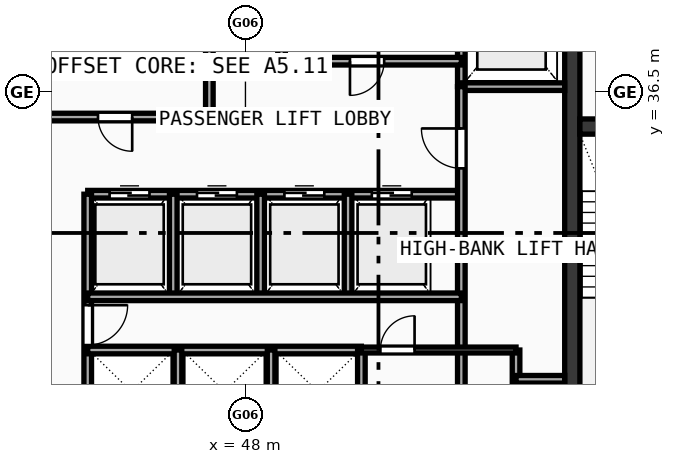
"""IFC4 building model, lengths in metres.
Left out: names, types, materials, properties, quantities, classifications, styles, units other than length and angle.
Written with IfcOpenShell. Run it as: python <this file> out.ifc"""

import sys

from ifc_helpers import new_model, si_unit, direction, frame, frame_2d, origin, origin_with_axes, place, context, subcontext, project, spatial, rectangle, extrude, source, transform, mapped, element, fill, save


model = new_model("IFC4")
c1 = context("Model", 3, precision=1e-05, world=origin(), true_north=direction((0.0, 1.0)))
c2 = subcontext(c1, "Body", "Model", "MODEL_VIEW")
j1 = project(units=[si_unit("LENGTHUNIT", "METRE"), si_unit("PLANEANGLEUNIT", "RADIAN")], contexts=[c1])
p1 = place(None, origin())
s1 = spatial("IfcSite", under=j1, at=p1, CompositionType="ELEMENT")
p2 = place(p1, origin())
s2 = spatial("IfcBuilding", under=s1, at=p2, CompositionType="ELEMENT")
p3 = place(p2, frame((0.0, 0.0, 148.23)))
s3 = spatial("IfcBuildingStorey", under=s2, at=p3, CompositionType="ELEMENT", Elevation=148.23)
p4 = place(p3, frame((56.6, 27.8, 0.0), z_axis=(0.0, 0.0, 1.0), x_axis=(0.0, 1.0, 0.0)))
e1 = element("IfcWall", 1, at=p4, inside=s3, PredefinedType="SHEAR", context=c2, shape_type="SweptSolid", body=[
    extrude(rectangle(XDim=12.1, YDim=0.4, at=frame_2d((6.05, 0.0))), origin(), (0.0, 0.0, 1.0), 3.42),
])
p5 = place(p4, frame((9.95, 0.0, 0.0)))
e2 = element("IfcOpeningElement", 2, at=p5, cuts=e1, PredefinedType="OPENING", context=c2, shape_type="SweptSolid", body=[
    extrude(rectangle(XDim=1.1, YDim=2.1, at=frame_2d((0.55, 1.05))), frame((0.0, 0.21, 0.0), z_axis=(0.0, -1.0, 0.0), x_axis=(1.0, 0.0, 0.0)), (0.0, 0.0, 1.0), 0.42),
])
p6 = place(p3, frame((56.8, 35.6, 0.0), z_axis=(0.0, 0.0, 1.0), x_axis=(1.0, 0.0, 0.0)))
e3 = element("IfcWall", 3, at=p6, inside=s3, PredefinedType="SHEAR", context=c2, shape_type="SweptSolid", body=[
    extrude(rectangle(XDim=3.1, YDim=0.4, at=frame_2d((1.55, 0.0))), origin(), (0.0, 0.0, 1.0), 3.42),
])
p7 = place(p6, frame((1.02, 0.0, 0.0)))
e4 = element("IfcOpeningElement", 4, at=p7, cuts=e3, PredefinedType="OPENING", context=c2, shape_type="SweptSolid", body=[
    extrude(rectangle(XDim=1.05, YDim=2.1, at=frame_2d((0.525, 1.05))), frame((0.0, 0.21, 0.0), z_axis=(0.0, -1.0, 0.0), x_axis=(1.0, 0.0, 0.0)), (0.0, 0.0, 1.0), 0.42),
])
p8 = place(p3, frame((53.68, 36.65, 0.0), z_axis=(0.0, 0.0, 1.0), x_axis=(0.0, 1.0, 0.0)))
e5 = element("IfcWall", 5, at=p8, inside=s3, PredefinedType="SOLIDWALL", context=c2, shape_type="SweptSolid", body=[
    extrude(rectangle(XDim=3.3, YDim=0.2, at=frame_2d((1.65, 0.0))), origin(), (0.0, 0.0, 1.0), 3.42),
])
p9 = place(p3, frame((53.68, 36.65, 0.0), z_axis=(0.0, 0.0, 1.0), x_axis=(1.0, 0.0, 0.0)))
e6 = element("IfcWall", 6, at=p9, inside=s3, PredefinedType="SOLIDWALL", context=c2, shape_type="SweptSolid", body=[
    extrude(rectangle(XDim=2.72, YDim=0.2, at=frame_2d((1.36, 0.0))), origin(), (0.0, 0.0, 1.0), 3.42),
])
p10 = place(p3, frame((42.32, 35.85, 0.0), z_axis=(0.0, 0.0, 1.0), x_axis=(1.0, 0.0, 0.0)))
e7 = element("IfcWall", 7, at=p10, inside=s3, PredefinedType="SOLIDWALL", context=c2, shape_type="SweptSolid", body=[
    extrude(rectangle(XDim=4.73, YDim=0.2, at=frame_2d((2.365, 0.0))), origin(), (0.0, 0.0, 1.0), 3.42),
])
p11 = place(p10, frame((1.8, 0.0, 0.0)))
e8 = element("IfcOpeningElement", 8, at=p11, cuts=e7, PredefinedType="OPENING", context=c2, shape_type="SweptSolid", body=[
    extrude(rectangle(XDim=0.9, YDim=2.1, at=frame_2d((0.45, 1.05))), frame((0.0, 0.11, 0.0), z_axis=(0.0, -1.0, 0.0), x_axis=(1.0, 0.0, 0.0)), (0.0, 0.0, 1.0), 0.22),
])
p12 = place(p3, frame((48.95, 37.32, 0.0), z_axis=(0.0, 0.0, 1.0), x_axis=(1.0, 0.0, 0.0)))
e9 = element("IfcWall", 9, at=p12, inside=s3, PredefinedType="SOLIDWALL", context=c2, shape_type="SweptSolid", body=[
    extrude(rectangle(XDim=4.73, YDim=0.2, at=frame_2d((2.365, 0.0))), origin(), (0.0, 0.0, 1.0), 3.42),
])
p13 = place(p12, frame((1.8, 0.0, 0.0)))
e10 = element("IfcOpeningElement", 10, at=p13, cuts=e9, PredefinedType="OPENING", context=c2, shape_type="SweptSolid", body=[
    extrude(rectangle(XDim=0.9, YDim=2.1, at=frame_2d((0.45, 1.05))), frame((0.0, 0.11, 0.0), z_axis=(0.0, -1.0, 0.0), x_axis=(1.0, 0.0, 0.0)), (0.0, 0.0, 1.0), 0.22),
])
p14 = place(p3, frame((47.05, 35.85, 0.0), z_axis=(0.0, 0.0, 1.0), x_axis=(0.0, 1.0, 0.0)))
e11 = element("IfcWall", 11, at=p14, inside=s3, PredefinedType="SOLIDWALL", context=c2, shape_type="SweptSolid", body=[
    extrude(rectangle(XDim=4.1, YDim=0.2, at=frame_2d((2.05, 0.0))), origin(), (0.0, 0.0, 1.0), 3.42),
])
p15 = place(p3, frame((48.95, 37.32, 0.0), z_axis=(0.0, 0.0, 1.0), x_axis=(0.0, 1.0, 0.0)))
e12 = element("IfcWall", 12, at=p15, inside=s3, PredefinedType="SOLIDWALL", context=c2, shape_type="SweptSolid", body=[
    extrude(rectangle(XDim=2.63, YDim=0.2, at=frame_2d((1.315, 0.0))), origin(), (0.0, 0.0, 1.0), 3.42),
])
p16 = place(p3, frame((43.85, 33.82, 0.0), z_axis=(0.0, 0.0, 1.0), x_axis=(1.0, 0.0, 0.0)))
e13 = element("IfcWall", 13, at=p16, inside=s3, PredefinedType="SOLIDWALL", context=c2, shape_type="SweptSolid", body=[
    extrude(rectangle(XDim=9.83, YDim=0.2, at=frame_2d((4.915, 0.0))), origin(), (0.0, 0.0, 1.0), 3.42),
])
p17 = place(p16, frame((0.575, 0.0, 0.0)))
e14 = element("IfcOpeningElement", 14, at=p17, cuts=e13, PredefinedType="OPENING", context=c2, shape_type="SweptSolid", body=[
    extrude(rectangle(XDim=1.05, YDim=2.1, at=frame_2d((0.525, 1.05))), frame((0.0, 0.11, 0.0), z_axis=(0.0, -1.0, 0.0), x_axis=(1.0, 0.0, 0.0)), (0.0, 0.0, 1.0), 0.22),
])
p18 = place(p16, frame((2.875, 0.0, 0.0)))
e15 = element("IfcOpeningElement", 15, at=p18, cuts=e13, PredefinedType="OPENING", context=c2, shape_type="SweptSolid", body=[
    extrude(rectangle(XDim=1.05, YDim=2.1, at=frame_2d((0.525, 1.05))), frame((0.0, 0.11, 0.0), z_axis=(0.0, -1.0, 0.0), x_axis=(1.0, 0.0, 0.0)), (0.0, 0.0, 1.0), 0.22),
])
p19 = place(p16, frame((5.175, 0.0, 0.0)))
e16 = element("IfcOpeningElement", 16, at=p19, cuts=e13, PredefinedType="OPENING", context=c2, shape_type="SweptSolid", body=[
    extrude(rectangle(XDim=1.05, YDim=2.1, at=frame_2d((0.525, 1.05))), frame((0.0, 0.11, 0.0), z_axis=(0.0, -1.0, 0.0), x_axis=(1.0, 0.0, 0.0)), (0.0, 0.0, 1.0), 0.22),
])
p20 = place(p16, frame((7.475, 0.0, 0.0)))
e17 = element("IfcOpeningElement", 17, at=p20, cuts=e13, PredefinedType="OPENING", context=c2, shape_type="SweptSolid", body=[
    extrude(rectangle(XDim=1.05, YDim=2.1, at=frame_2d((0.525, 1.05))), frame((0.0, 0.11, 0.0), z_axis=(0.0, -1.0, 0.0), x_axis=(1.0, 0.0, 0.0)), (0.0, 0.0, 1.0), 0.22),
])
p21 = place(p3, frame((43.85, 27.6, 0.0), z_axis=(0.0, 0.0, 1.0), x_axis=(0.0, 1.0, 0.0)))
e18 = element("IfcWall", 18, at=p21, inside=s3, PredefinedType="SOLIDWALL", context=c2, shape_type="SweptSolid", body=[
    extrude(rectangle(XDim=6.22, YDim=0.2, at=frame_2d((3.11, 0.0))), origin(), (0.0, 0.0, 1.0), 3.42),
])
p22 = place(p21, frame((2.25, 0.0, 0.0)))
e19 = element("IfcOpeningElement", 19, at=p22, cuts=e18, PredefinedType="OPENING", context=c2, shape_type="SweptSolid", body=[
    extrude(rectangle(XDim=1.05, YDim=2.1, at=frame_2d((0.525, 1.05))), frame((0.0, 0.11, 0.0), z_axis=(0.0, -1.0, 0.0), x_axis=(1.0, 0.0, 0.0)), (0.0, 0.0, 1.0), 0.22),
])
p23 = place(p3, frame((53.68, 27.6, 0.0), z_axis=(0.0, 0.0, 1.0), x_axis=(0.0, 1.0, 0.0)))
e20 = element("IfcWall", 20, at=p23, inside=s3, PredefinedType="SOLIDWALL", context=c2, shape_type="SweptSolid", body=[
    extrude(rectangle(XDim=9.05, YDim=0.2, at=frame_2d((4.525, 0.0))), origin(), (0.0, 0.0, 1.0), 3.42),
])
p24 = place(p23, frame((6.9, 0.0, 0.0)))
e21 = element("IfcOpeningElement", 21, at=p24, cuts=e20, PredefinedType="OPENING", context=c2, shape_type="SweptSolid", body=[
    extrude(rectangle(XDim=1.05, YDim=2.1, at=frame_2d((0.525, 1.05))), frame((0.0, 0.11, 0.0), z_axis=(0.0, -1.0, 0.0), x_axis=(1.0, 0.0, 0.0)), (0.0, 0.0, 1.0), 0.22),
])
for number, where, z_axis, x_axis in (
    (22, (46.1, 31.12, 0.0), (0.0, 0.0, 1.0), (0.0, 1.0, 0.0)),
    (23, (48.4, 31.12, 0.0), (0.0, 0.0, 1.0), (0.0, 1.0, 0.0)),
    (24, (50.7, 31.12, 0.0), (0.0, 0.0, 1.0), (0.0, 1.0, 0.0)),
):
    element("IfcWall", number, at=place(p3, frame(where, z_axis=z_axis, x_axis=x_axis)), inside=s3, PredefinedType="SOLIDWALL", context=c2, shape_type="SweptSolid", body=[
        extrude(rectangle(XDim=2.7, YDim=0.2, at=frame_2d((1.35, 0.0))), origin(), (0.0, 0.0, 1.0), 3.42),
    ])
p25 = place(p3, frame((43.85, 29.72, 0.0), z_axis=(0.0, 0.0, 1.0), x_axis=(1.0, 0.0, 0.0)))
e25 = element("IfcWall", 25, at=p25, inside=s3, PredefinedType="SOLIDWALL", context=c2, shape_type="SweptSolid", body=[
    extrude(rectangle(XDim=7.2, YDim=0.2, at=frame_2d((3.6, 0.0))), origin(), (0.0, 0.0, 1.0), 3.42),
])
p26 = place(p3, frame((51.05, 27.6, 0.0), z_axis=(0.0, 0.0, 1.0), x_axis=(0.0, 1.0, 0.0)))
e26 = element("IfcWall", 26, at=p26, inside=s3, PredefinedType="SOLIDWALL", context=c2, shape_type="SweptSolid", body=[
    extrude(rectangle(XDim=2.12, YDim=0.2, at=frame_2d((1.06, 0.0))), origin(), (0.0, 0.0, 1.0), 3.42),
])
p27 = place(p3, frame((43.85, 31.12, 0.0), z_axis=(0.0, 0.0, 1.0), x_axis=(1.0, 0.0, 0.0)))
e27 = element("IfcWall", 27, at=p27, inside=s3, PredefinedType="SOLIDWALL", context=c2, shape_type="SweptSolid", body=[
    extrude(rectangle(XDim=9.83, YDim=0.2, at=frame_2d((4.915, 0.0))), origin(), (0.0, 0.0, 1.0), 3.42),
])
for number, where, z_axis, x_axis in (
    (28, (46.225, 27.6, 0.0), (0.0, 0.0, 1.0), (0.0, 1.0, 0.0)),
    (29, (48.675, 27.6, 0.0), (0.0, 0.0, 1.0), (0.0, 1.0, 0.0)),
    (30, (55.12, 27.6, 0.0), (0.0, 0.0, 1.0), (0.0, 1.0, 0.0)),
):
    element("IfcWall", number, at=place(p3, frame(where, z_axis=z_axis, x_axis=x_axis)), inside=s3, PredefinedType="SOLIDWALL", context=c2, shape_type="SweptSolid", body=[
        extrude(rectangle(XDim=2.12, YDim=0.2, at=frame_2d((1.06, 0.0))), origin(), (0.0, 0.0, 1.0), 3.42),
    ])
p28 = place(p3, frame((55.12, 28.95, 0.0), z_axis=(0.0, 0.0, 1.0), x_axis=(1.0, 0.0, 0.0)))
e31 = element("IfcWall", 31, at=p28, inside=s3, PredefinedType="SOLIDWALL", context=c2, shape_type="SweptSolid", body=[
    extrude(rectangle(XDim=1.28, YDim=0.2, at=frame_2d((0.64, 0.0))), origin(), (0.0, 0.0, 1.0), 3.42),
])
p29 = place(p3, frame((51.05, 29.72, 0.0), z_axis=(0.0, 0.0, 1.0), x_axis=(1.0, 0.0, 0.0)))
e32 = element("IfcWall", 32, at=p29, inside=s3, PredefinedType="PARTITIONING", context=c2, shape_type="SweptSolid", body=[
    extrude(rectangle(XDim=4.07, YDim=0.155, at=frame_2d((2.035, 0.0))), origin(), (0.0, 0.0, 1.0), 3.42),
])
p30 = place(p29, frame((0.5, 0.0, 0.0)))
e33 = element("IfcOpeningElement", 33, at=p30, cuts=e32, PredefinedType="OPENING", context=c2, shape_type="SweptSolid", body=[
    extrude(rectangle(XDim=0.9, YDim=2.1, at=frame_2d((0.45, 1.05))), frame((0.0, 0.087, 0.0), z_axis=(0.0, -1.0, 0.0), x_axis=(1.0, 0.0, 0.0)), (0.0, 0.0, 1.0), 0.175),
])
m1 = source(origin(), c2, "Body", "SweptSolid", [
    extrude(rectangle(XDim=0.9, YDim=2.1, at=frame_2d((0.45, 1.05))), frame((0.0, 0.025, 0.0), z_axis=(0.0, -1.0, 0.0), x_axis=(1.0, 0.0, 0.0)), (0.0, 0.0, 1.0), 0.05),
])
p31 = place(p11, frame((0.9, 0.0, 0.0), z_axis=(0.0, 0.0, 1.0), x_axis=(-1.0, 0.0, 0.0)))
e34 = element("IfcDoor", 34, at=p31, inside=s3, OperationType="SINGLE_SWING_LEFT", PredefinedType="DOOR", context=c2, shape_type="MappedRepresentation", body=[
    mapped(m1, transform((0.0, 0.0, 0.0), scale=1.0)),
])
fill(e8, e34)
p32 = place(p13, frame((0.9, 0.0, 0.0), z_axis=(0.0, 0.0, 1.0), x_axis=(-1.0, 0.0, 0.0)))
e35 = element("IfcDoor", 35, at=p32, inside=s3, OperationType="SINGLE_SWING_RIGHT", PredefinedType="DOOR", context=c2, shape_type="MappedRepresentation", body=[
    mapped(m1, transform((0.0, 0.0, 0.0), scale=1.0)),
])
fill(e10, e35)
m2 = source(origin(), c2, "Body", "SweptSolid", [
    extrude(rectangle(XDim=1.05, YDim=2.1, at=frame_2d((0.525, 1.05))), frame((0.0, 0.025, 0.0), z_axis=(0.0, -1.0, 0.0), x_axis=(1.0, 0.0, 0.0)), (0.0, 0.0, 1.0), 0.05),
])
p33 = place(p17, origin_with_axes())
e36 = element("IfcDoor", 36, at=p33, inside=s3, OperationType="DOUBLE_DOOR_SLIDING", PredefinedType="DOOR", context=c2, shape_type="MappedRepresentation", body=[
    mapped(m2, transform((0.0, 0.0, 0.0), scale=1.0)),
])
fill(e14, e36)
p34 = place(p18, origin_with_axes())
e37 = element("IfcDoor", 37, at=p34, inside=s3, OperationType="DOUBLE_DOOR_SLIDING", PredefinedType="DOOR", context=c2, shape_type="MappedRepresentation", body=[
    mapped(m2, transform((0.0, 0.0, 0.0), scale=1.0)),
])
fill(e15, e37)
p35 = place(p19, origin_with_axes())
e38 = element("IfcDoor", 38, at=p35, inside=s3, OperationType="DOUBLE_DOOR_SLIDING", PredefinedType="DOOR", context=c2, shape_type="MappedRepresentation", body=[
    mapped(m2, transform((0.0, 0.0, 0.0), scale=1.0)),
])
fill(e16, e38)
p36 = place(p20, origin_with_axes())
e39 = element("IfcDoor", 39, at=p36, inside=s3, OperationType="DOUBLE_DOOR_SLIDING", PredefinedType="DOOR", context=c2, shape_type="MappedRepresentation", body=[
    mapped(m2, transform((0.0, 0.0, 0.0), scale=1.0)),
])
fill(e17, e39)
p37 = place(p22, frame((1.05, 0.0, 0.0), z_axis=(0.0, 0.0, 1.0), x_axis=(-1.0, 0.0, 0.0)))
e40 = element("IfcDoor", 40, at=p37, inside=s3, OperationType="SINGLE_SWING_LEFT", PredefinedType="DOOR", context=c2, shape_type="MappedRepresentation", body=[
    mapped(m2, transform((0.0, 0.0, 0.0), scale=1.0)),
])
fill(e19, e40)
p38 = place(p24, origin_with_axes())
e41 = element("IfcDoor", 41, at=p38, inside=s3, OperationType="SINGLE_SWING_RIGHT", PredefinedType="DOOR", context=c2, shape_type="MappedRepresentation", body=[
    mapped(m2, transform((0.0, 0.0, 0.0), scale=1.0)),
])
fill(e21, e41)
p39 = place(p30, origin_with_axes())
e42 = element("IfcDoor", 42, at=p39, inside=s3, OperationType="SINGLE_SWING_RIGHT", PredefinedType="DOOR", context=c2, shape_type="MappedRepresentation", body=[
    mapped(m1, transform((0.0, 0.0, 0.0), scale=1.0)),
])
fill(e33, e42)
save(model, sys.argv[1])
